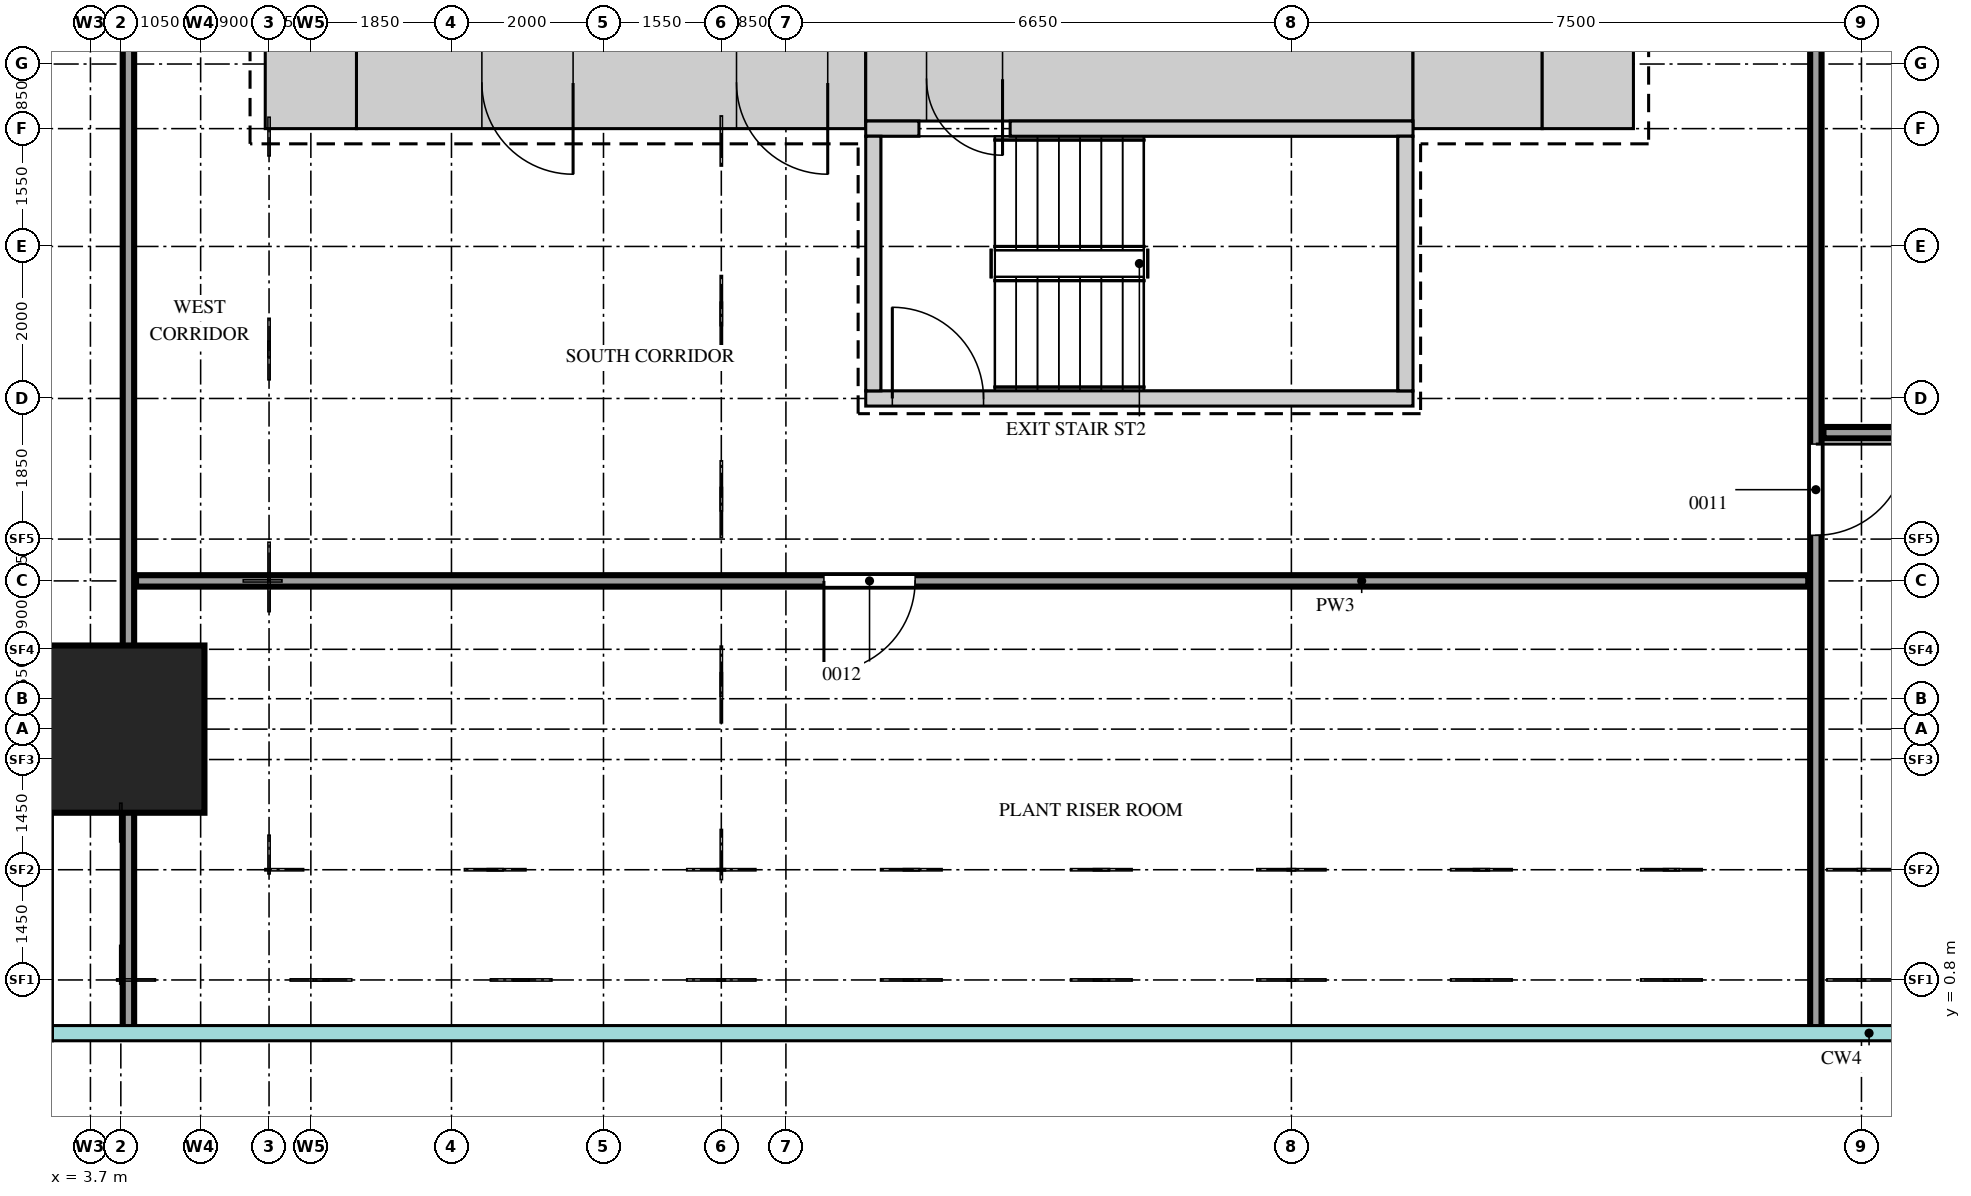
"""IFC4 building model, lengths in metres.
Left out: names, types, materials, properties, quantities, classifications, styles, units other than length and angle.
Written with IfcOpenShell. Run it as: python <this file> out.ifc"""

import sys

from ifc_helpers import new_model, si_unit, direction, frame, frame_2d, origin, origin_2d, place, context, subcontext, project, spatial, rectangle, extrude, source, transform, mapped, element, fill, save


model = new_model("IFC4")
c1 = context("Model", 3, precision=1e-05, world=origin(), true_north=direction((0.0, 1.0)))
c2 = subcontext(c1, "Body", "Model", "MODEL_VIEW")
j1 = project(units=[si_unit("LENGTHUNIT", "METRE"), si_unit("PLANEANGLEUNIT", "RADIAN")], contexts=[c1])
p1 = place(None, origin())
s1 = spatial("IfcSite", under=j1, at=p1, CompositionType="ELEMENT")
p2 = place(p1, origin())
s2 = spatial("IfcBuilding", under=s1, at=p2, CompositionType="ELEMENT")
p3 = place(p2, frame((0.0, 0.0, 96.0)))
s3 = spatial("IfcBuildingStorey", under=s2, at=p3, CompositionType="ELEMENT", Elevation=96.0)
m1 = source(origin(), c2, "Body", "SweptSolid", [
    extrude(rectangle(XDim=6.7, YDim=1.2, at=frame_2d((3.35, 0.0))), origin(), (0.0, 0.0, 1.0), 5.2),
])
p4 = place(p3, frame((7.2, 12.6, 0.0), z_axis=(0.0, 0.0, 1.0), x_axis=(1.0, 0.0, 0.0)))
e1 = element("IfcWall", 1, at=p4, inside=s3, PredefinedType="SHEAR", context=c2, shape_type="MappedRepresentation", body=[
    mapped(m1, transform((0.0, 0.0, 0.0))),
])
m2 = source(origin(), c2, "Body", "SweptSolid", [
    extrude(rectangle(XDim=1.2, YDim=2.1, at=frame_2d((0.6, 1.05))), frame((0.0, 0.61, 0.0), z_axis=(0.0, -1.0, 0.0), x_axis=(1.0, 0.0, 0.0)), (0.0, 0.0, 1.0), 1.22),
])
p5 = place(p4, frame((5.0, 0.0, 0.0)))
e2 = element("IfcOpeningElement", 2, at=p5, cuts=e1, PredefinedType="OPENING", context=c2, shape_type="MappedRepresentation", body=[
    mapped(m2, transform((0.0, 0.0, 0.0))),
])
p6 = place(p4, frame((1.65, 0.0, 0.0)))
e3 = element("IfcOpeningElement", 3, at=p6, cuts=e1, PredefinedType="OPENING", context=c2, shape_type="MappedRepresentation", body=[
    mapped(m2, transform((0.0, 0.0, 0.0))),
])
m3 = source(origin(), c2, "Body", "SweptSolid", [
    extrude(rectangle(XDim=7.2, YDim=1.1, at=frame_2d((3.6, 0.0))), origin(), (0.0, 0.0, 1.0), 5.2),
])
p7 = place(p3, frame((13.9, 12.65, 0.0), z_axis=(0.0, 0.0, 1.0), x_axis=(1.0, 0.0, 0.0)))
e4 = element("IfcWall", 4, at=p7, inside=s3, PredefinedType="SHEAR", context=c2, shape_type="MappedRepresentation", body=[
    mapped(m3, transform((0.0, 0.0, 0.0))),
])
m4 = source(origin(), c2, "Body", "SweptSolid", [
    extrude(rectangle(XDim=1.0, YDim=2.1, at=frame_2d((0.5, 1.05))), frame((0.0, 0.56, 0.0), z_axis=(0.0, -1.0, 0.0), x_axis=(1.0, 0.0, 0.0)), (0.0, 0.0, 1.0), 1.12),
])
p8 = place(p7, frame((0.8, 0.0, 0.0)))
e5 = element("IfcOpeningElement", 5, at=p8, cuts=e4, PredefinedType="OPENING", context=c2, shape_type="MappedRepresentation", body=[
    mapped(m4, transform((0.0, 0.0, 0.0))),
])
m5 = source(origin(), c2, "Body", "SweptSolid", [
    extrude(rectangle(XDim=1.7, YDim=1.2, at=frame_2d((0.85, 0.0))), origin(), (0.0, 0.0, 1.0), 5.2),
])
p9 = place(p3, frame((21.1, 12.6, 0.0), z_axis=(0.0, 0.0, 1.0), x_axis=(1.0, 0.0, 0.0)))
e6 = element("IfcWall", 6, at=p9, inside=s3, PredefinedType="SHEAR", context=c2, shape_type="MappedRepresentation", body=[
    mapped(m5, transform((0.0, 0.0, 0.0))),
])
m6 = source(origin(), c2, "Body", "SweptSolid", [
    extrude(rectangle(XDim=1.2, YDim=1.2, at=frame_2d((0.6, 0.0))), origin(), (0.0, 0.0, 1.0), 5.2),
])
for number, where, z_axis, x_axis in (
    (7, (22.8, 12.6, 0.0), (0.0, 0.0, 1.0), (1.0, 0.0, 0.0)),
    (8, (6.0, 12.6, 0.0), (0.0, 0.0, 1.0), (1.0, 0.0, 0.0)),
):
    element("IfcWall", number, at=place(p3, frame(where, z_axis=z_axis, x_axis=x_axis)), inside=s3, PredefinedType="SHEAR", context=c2, shape_type="MappedRepresentation", body=[
        mapped(m6, transform((0.0, 0.0, 0.0))),
    ])
m7 = source(origin(), c2, "Body", "SweptSolid", [
    extrude(rectangle(XDim=0.7, YDim=0.2, at=frame_2d((0.35, 0.0))), origin(), (0.0, 0.0, 1.0), 5.2),
])
p10 = place(p3, frame((13.9, 12.0, 0.0), z_axis=(0.0, 0.0, 1.0), x_axis=(1.0, 0.0, 0.0)))
e9 = element("IfcWall", 9, at=p10, inside=s3, PredefinedType="SHEAR", context=c2, shape_type="MappedRepresentation", body=[
    mapped(m7, transform((0.0, 0.0, 0.0))),
])
m8 = source(origin(), c2, "Body", "SweptSolid", [
    extrude(rectangle(XDim=5.3, YDim=0.2, at=frame_2d((2.65, 0.0))), origin(), (0.0, 0.0, 1.0), 5.2),
])
p11 = place(p3, frame((15.8, 12.0, 0.0), z_axis=(0.0, 0.0, 1.0), x_axis=(1.0, 0.0, 0.0)))
e10 = element("IfcWall", 10, at=p11, inside=s3, PredefinedType="SHEAR", context=c2, shape_type="MappedRepresentation", body=[
    mapped(m8, transform((0.0, 0.0, 0.0))),
])
m9 = source(origin(), c2, "Body", "SweptSolid", [
    extrude(rectangle(XDim=7.2, YDim=0.2, at=frame_2d((3.6, 0.0))), origin(), (0.0, 0.0, 1.0), 5.2),
])
p12 = place(p3, frame((13.9, 8.45, 0.0), z_axis=(0.0, 0.0, 1.0), x_axis=(1.0, 0.0, 0.0)))
e11 = element("IfcWall", 11, at=p12, inside=s3, PredefinedType="SHEAR", context=c2, shape_type="MappedRepresentation", body=[
    mapped(m9, transform((0.0, 0.0, 0.0))),
])
m10 = source(origin(), c2, "Body", "SweptSolid", [
    extrude(rectangle(XDim=1.2, YDim=2.1, at=frame_2d((0.6, 1.05))), frame((0.0, 0.11, 0.0), z_axis=(0.0, -1.0, 0.0), x_axis=(1.0, 0.0, 0.0)), (0.0, 0.0, 1.0), 0.22),
])
p13 = place(p12, frame((0.35, 0.0, 0.0)))
e12 = element("IfcOpeningElement", 12, at=p13, cuts=e11, PredefinedType="OPENING", context=c2, shape_type="MappedRepresentation", body=[
    mapped(m10, transform((0.0, 0.0, 0.0))),
])
m11 = source(origin(), c2, "Body", "SweptSolid", [
    extrude(rectangle(XDim=3.35, YDim=0.2, at=frame_2d((1.675, 0.0))), origin(), (0.0, 0.0, 1.0), 5.2),
])
for number, where, z_axis, x_axis in (
    (13, (21.0, 8.55, 0.0), (0.0, 0.0, 1.0), (0.0, 1.0, 0.0)),
    (14, (14.0, 8.55, 0.0), (0.0, 0.0, 1.0), (0.0, 1.0, 0.0)),
):
    element("IfcWall", number, at=place(p3, frame(where, z_axis=z_axis, x_axis=x_axis)), inside=s3, PredefinedType="SHEAR", context=c2, shape_type="MappedRepresentation", body=[
        mapped(m11, transform((0.0, 0.0, 0.0))),
    ])
m12 = source(origin(), c2, "Body", "SweptSolid", [
    extrude(rectangle(XDim=2.2, YDim=2.2, at=origin_2d()), origin(), (0.0, 0.0, 1.0), 5.5),
])
p14 = place(p3, frame((4.1, 4.1, 0.0), z_axis=(0.0, 0.0, 1.0), x_axis=(1.0, 0.0, 0.0)))
e15 = element("IfcColumn", 15, at=p14, inside=s3, PredefinedType="COLUMN", context=c2, shape_type="MappedRepresentation", body=[
    mapped(m12, transform((0.0, 0.0, 0.0))),
])
m13 = source(origin(), c2, "Body", "SweptSolid", [
    extrude(rectangle(XDim=53.7, YDim=0.15, at=frame_2d((26.85, 0.0))), origin(), (0.0, 0.0, 1.0), 5.2),
])
p15 = place(p3, frame((4.2, 0.15, 0.0), z_axis=(0.0, 0.0, 1.0), x_axis=(0.0, 1.0, 0.0)))
e16 = element("IfcWall", 16, at=p15, inside=s3, PredefinedType="PARTITIONING", context=c2, shape_type="MappedRepresentation", body=[
    mapped(m13, transform((0.0, 0.0, 0.0))),
])
m14 = source(origin(), c2, "Body", "SweptSolid", [
    extrude(rectangle(XDim=0.9, YDim=2.1, at=frame_2d((0.45, 1.05))), frame((0.0, 0.085, 0.0), z_axis=(0.0, -1.0, 0.0), x_axis=(1.0, 0.0, 0.0)), (0.0, 0.0, 1.0), 0.17),
])
p16 = place(p15, frame((13.45, 0.0, 0.0)))
e17 = element("IfcOpeningElement", 17, at=p16, cuts=e16, PredefinedType="OPENING", context=c2, shape_type="MappedRepresentation", body=[
    mapped(m14, transform((0.0, 0.0, 0.0))),
])
m15 = source(origin(), c2, "Body", "SweptSolid", [
    extrude(rectangle(XDim=1.2, YDim=2.1, at=frame_2d((0.6, 1.05))), frame((0.0, 0.085, 0.0), z_axis=(0.0, -1.0, 0.0), x_axis=(1.0, 0.0, 0.0)), (0.0, 0.0, 1.0), 0.17),
])
p17 = place(p15, frame((32.05, 0.0, 0.0)))
e18 = element("IfcOpeningElement", 18, at=p17, cuts=e16, PredefinedType="OPENING", context=c2, shape_type="MappedRepresentation", body=[
    mapped(m15, transform((0.0, 0.0, 0.0))),
])
m16 = source(origin(), c2, "Body", "SweptSolid", [
    extrude(rectangle(XDim=35.05, YDim=0.15, at=frame_2d((17.525, 0.0))), origin(), (0.0, 0.0, 1.0), 5.2),
])
p18 = place(p3, frame((26.4, 0.15, 0.0), z_axis=(0.0, 0.0, 1.0), x_axis=(0.0, 1.0, 0.0)))
e19 = element("IfcWall", 19, at=p18, inside=s3, PredefinedType="PARTITIONING", context=c2, shape_type="MappedRepresentation", body=[
    mapped(m16, transform((0.0, 0.0, 0.0))),
])
p19 = place(p18, frame((6.5, 0.0, 0.0)))
e20 = element("IfcOpeningElement", 20, at=p19, cuts=e19, PredefinedType="OPENING", context=c2, shape_type="MappedRepresentation", body=[
    mapped(m15, transform((0.0, 0.0, 0.0))),
])
p20 = place(p18, frame((14.25, 0.0, 0.0)))
e21 = element("IfcOpeningElement", 21, at=p20, cuts=e19, PredefinedType="OPENING", context=c2, shape_type="MappedRepresentation", body=[
    mapped(m15, transform((0.0, 0.0, 0.0))),
])
m17 = source(origin(), c2, "Body", "SweptSolid", [
    extrude(rectangle(XDim=22.0, YDim=0.15, at=frame_2d((11.0, 0.0))), origin(), (0.0, 0.0, 1.0), 5.2),
])
p21 = place(p3, frame((4.3, 6.05, 0.0), z_axis=(0.0, 0.0, 1.0), x_axis=(1.0, 0.0, 0.0)))
e22 = element("IfcWall", 22, at=p21, inside=s3, PredefinedType="PARTITIONING", context=c2, shape_type="MappedRepresentation", body=[
    mapped(m17, transform((0.0, 0.0, 0.0))),
])
p22 = place(p21, frame((9.05, 0.0, 0.0)))
e23 = element("IfcOpeningElement", 23, at=p22, cuts=e22, PredefinedType="OPENING", context=c2, shape_type="MappedRepresentation", body=[
    mapped(m15, transform((0.0, 0.0, 0.0))),
])
m18 = source(origin(), c2, "Body", "SweptSolid", [
    extrude(rectangle(XDim=27.35, YDim=0.15, at=frame_2d((13.675, 0.0))), origin(), (0.0, 0.0, 1.0), 5.2),
])
p23 = place(p3, frame((26.5, 8.0, 0.0), z_axis=(0.0, 0.0, 1.0), x_axis=(1.0, 0.0, 0.0)))
e24 = element("IfcWall", 24, at=p23, inside=s3, PredefinedType="PARTITIONING", context=c2, shape_type="MappedRepresentation", body=[
    mapped(m18, transform((0.0, 0.0, 0.0))),
])
m19 = source(origin(), c2, "Body", "SweptSolid", [
    extrude(rectangle(XDim=1.2, YDim=2.1, at=frame_2d((0.6, 1.05))), frame((0.0, 0.55, 0.0), z_axis=(0.0, -1.0, 0.0), x_axis=(1.0, 0.0, 0.0)), (0.0, 0.0, 1.0), 1.1),
])
p24 = place(p5, origin())
e25 = element("IfcDoor", 25, at=p24, inside=s3, OperationType="SINGLE_SWING_RIGHT", PredefinedType="DOOR", context=c2, shape_type="MappedRepresentation", body=[
    mapped(m19, transform((0.0, 0.0, 0.0))),
])
fill(e2, e25)
p25 = place(p6, origin())
e26 = element("IfcDoor", 26, at=p25, inside=s3, OperationType="SINGLE_SWING_RIGHT", PredefinedType="DOOR", context=c2, shape_type="MappedRepresentation", body=[
    mapped(m19, transform((0.0, 0.0, 0.0))),
])
fill(e3, e26)
m20 = source(origin(), c2, "Body", "SweptSolid", [
    extrude(rectangle(XDim=1.0, YDim=2.1, at=frame_2d((0.5, 1.05))), frame((0.0, 0.5, 0.0), z_axis=(0.0, -1.0, 0.0), x_axis=(1.0, 0.0, 0.0)), (0.0, 0.0, 1.0), 1.0),
])
p26 = place(p8, origin())
e27 = element("IfcDoor", 27, at=p26, inside=s3, OperationType="SINGLE_SWING_RIGHT", PredefinedType="DOOR", context=c2, shape_type="MappedRepresentation", body=[
    mapped(m20, transform((0.0, 0.0, 0.0))),
])
fill(e5, e27)
m21 = source(origin(), c2, "Body", "SweptSolid", [
    extrude(rectangle(XDim=1.2, YDim=2.1, at=frame_2d((0.6, 1.05))), frame((0.0, 0.025, 0.0), z_axis=(0.0, -1.0, 0.0), x_axis=(1.0, 0.0, 0.0)), (0.0, 0.0, 1.0), 0.05),
])
p27 = place(p19, origin())
e28 = element("IfcDoor", 28, at=p27, inside=s3, OperationType="SINGLE_SWING_RIGHT", PredefinedType="DOOR", context=c2, shape_type="MappedRepresentation", body=[
    mapped(m21, transform((0.0, 0.0, 0.0))),
])
fill(e20, e28)
p28 = place(p22, origin())
e29 = element("IfcDoor", 29, at=p28, inside=s3, OperationType="SINGLE_SWING_LEFT", PredefinedType="DOOR", context=c2, shape_type="MappedRepresentation", body=[
    mapped(m21, transform((0.0, 0.0, 0.0))),
])
fill(e23, e29)
p29 = place(p13, origin())
e30 = element("IfcDoor", 30, at=p29, inside=s3, OperationType="SINGLE_SWING_RIGHT", PredefinedType="DOOR", context=c2, shape_type="MappedRepresentation", body=[
    mapped(m21, transform((0.0, 0.0, 0.0))),
])
fill(e12, e30)
save(model, sys.argv[1])
